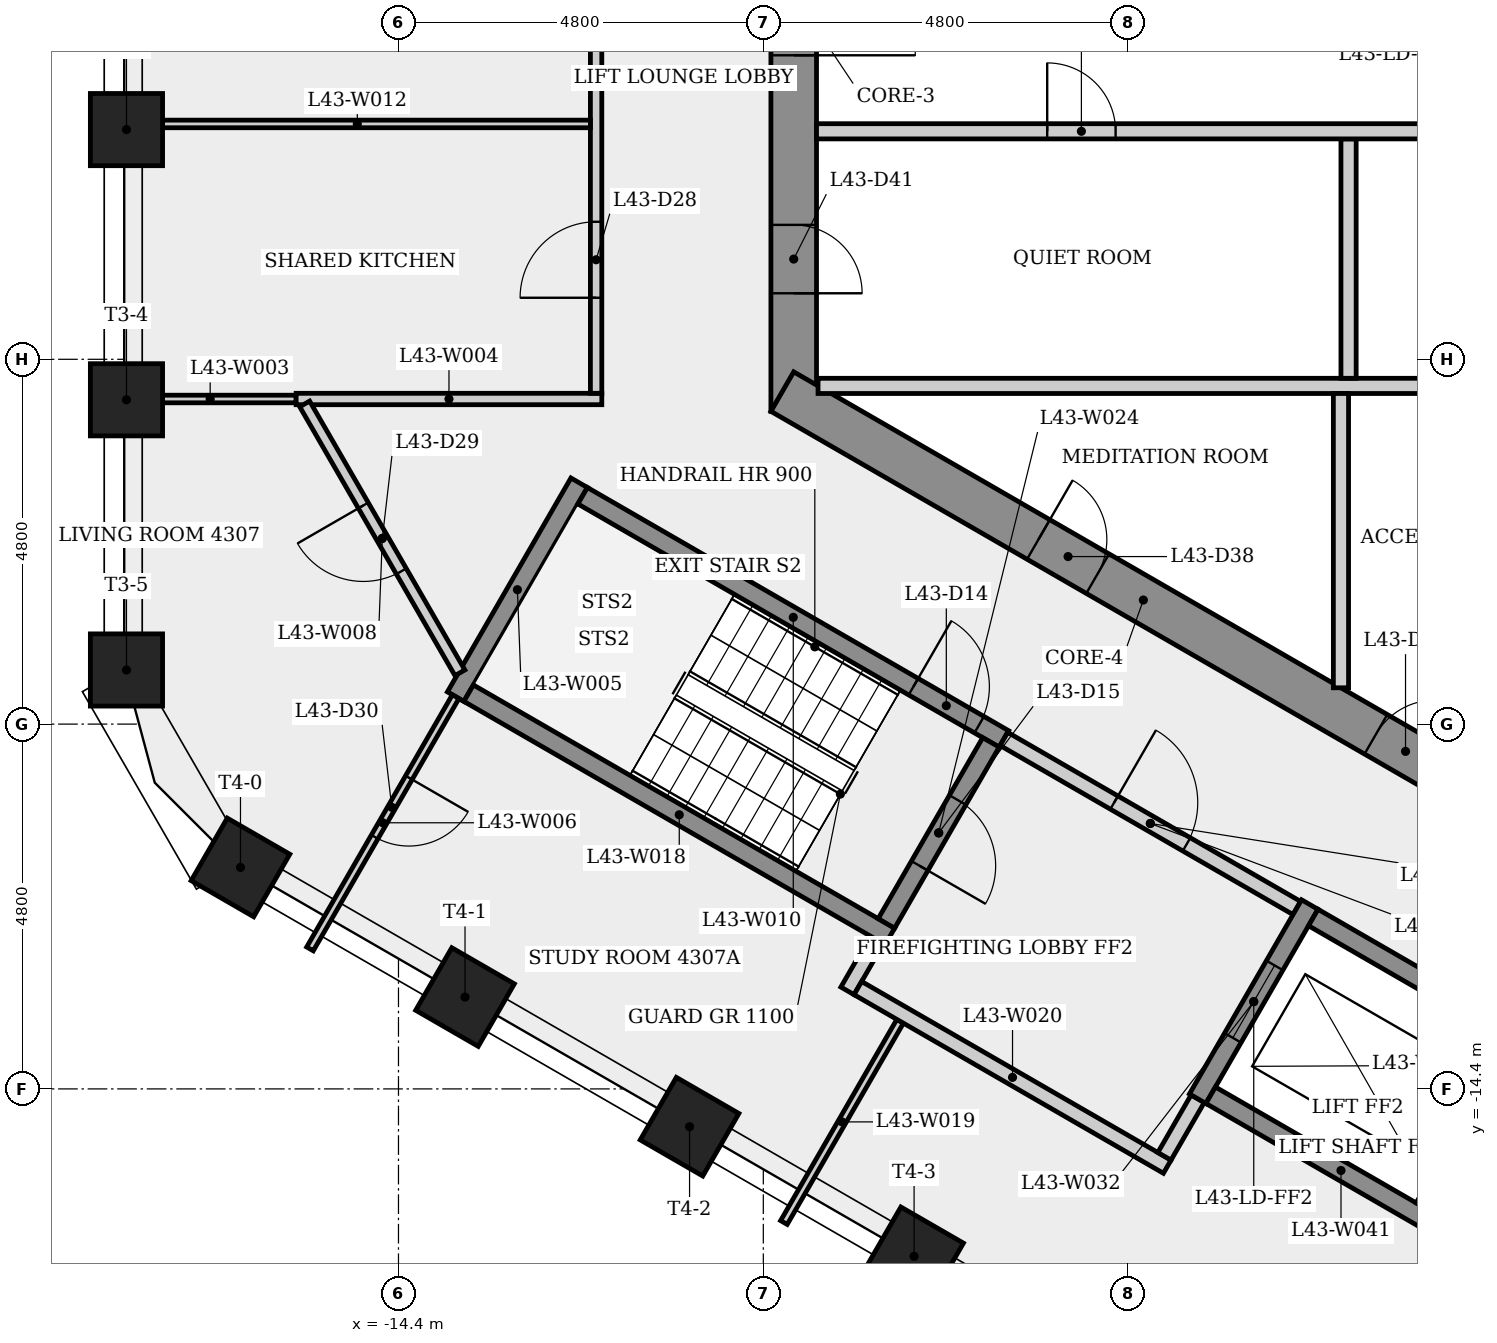
"""IFC4 building model, lengths in metres.
Left out: names, types, materials, properties, quantities, classifications, styles, units other than length and angle.
Written with IfcOpenShell. Run it as: python <this file> out.ifc"""

import sys

from ifc_helpers import new_model, si_unit, direction, frame, frame_2d, origin, origin_2d, place, context, subcontext, project, spatial, rectangle, extrude, element, fill, save


model = new_model("IFC4")
c1 = context("Model", 3, precision=1e-05, world=origin(), true_north=direction((0.0, 1.0)))
c2 = subcontext(c1, "Body", "Model", "MODEL_VIEW")
j1 = project(units=[si_unit("LENGTHUNIT", "METRE"), si_unit("PLANEANGLEUNIT", "RADIAN")], contexts=[c1])
p1 = place(None, origin())
s1 = spatial("IfcSite", under=j1, at=p1, CompositionType="ELEMENT")
p2 = place(p1, origin())
s2 = spatial("IfcBuilding", under=s1, at=p2, CompositionType="ELEMENT")
p3 = place(p2, frame((0.0, 0.0, 162.9)))
s3 = spatial("IfcBuildingStorey", under=s2, at=p3, CompositionType="ELEMENT", Elevation=162.9)
p4 = place(p3, frame((-9.2, 5.485, 0.0), z_axis=(0.0, 0.0, 1.0), x_axis=(0.0, -1.0, 0.0)))
e1 = element("IfcWall", 1, at=p4, inside=s3, PredefinedType="SHEAR", context=c2, shape_type="SweptSolid", body=[
    extrude(rectangle(XDim=10.97, YDim=0.6, at=frame_2d((5.485, 0.0))), origin(), (0.0, 0.0, 1.0), 3.4),
])
p5 = place(p4, frame((8.516, 0.0, 0.0)))
e2 = element("IfcOpeningElement", 2, at=p5, cuts=e1, PredefinedType="OPENING", context=c2, shape_type="SweptSolid", body=[
    extrude(rectangle(XDim=0.9, YDim=2.1, at=frame_2d((0.45, 1.05))), frame((0.0, 0.31, 0.0), z_axis=(0.0, -1.0, 0.0), x_axis=(1.0, 0.0, 0.0)), (0.0, 0.0, 1.0), 0.62),
])
p6 = place(p4, frame((4.685, 0.0, 0.0)))
e3 = element("IfcOpeningElement", 3, at=p6, cuts=e1, PredefinedType="OPENING", context=c2, shape_type="SweptSolid", body=[
    extrude(rectangle(XDim=1.6, YDim=2.1, at=frame_2d((0.8, 1.05))), frame((0.0, 0.31, 0.0), z_axis=(0.0, -1.0, 0.0), x_axis=(1.0, 0.0, 0.0)), (0.0, 0.0, 1.0), 0.62),
])
p7 = place(p3, frame((-9.35, -5.225, 0.0), z_axis=(0.0, 0.0, 1.0), x_axis=(0.866023993627, -0.500002442456, 0.0)))
e4 = element("IfcWall", 4, at=p7, inside=s3, PredefinedType="SHEAR", context=c2, shape_type="SweptSolid", body=[
    extrude(rectangle(XDim=10.97, YDim=0.6, at=frame_2d((5.485, 0.0))), origin(), (0.0, 0.0, 1.0), 3.4),
])
p8 = place(p7, frame((3.891, 0.0, 0.0)))
e5 = element("IfcOpeningElement", 5, at=p8, cuts=e4, PredefinedType="OPENING", context=c2, shape_type="SweptSolid", body=[
    extrude(rectangle(XDim=0.9, YDim=2.1, at=frame_2d((0.45, 1.05))), frame((0.0, 0.31, 0.0), z_axis=(0.0, -1.0, 0.0), x_axis=(1.0, 0.0, 0.0)), (0.0, 0.0, 1.0), 0.62),
])
p9 = place(p7, frame((9.018, 0.0, 0.0)))
e6 = element("IfcOpeningElement", 6, at=p9, cuts=e4, PredefinedType="OPENING", context=c2, shape_type="SweptSolid", body=[
    extrude(rectangle(XDim=0.9, YDim=2.1, at=frame_2d((0.45, 1.05))), frame((0.0, 0.31, 0.0), z_axis=(0.0, -1.0, 0.0), x_axis=(1.0, 0.0, 0.0)), (0.0, 0.0, 1.0), 0.62),
])
for number, where, z_axis, x_axis in (
    (7, (-17.979, -1.778, 0.0), (0.0, 0.0, 1.0), (-1.0, 0.0, 0.0)),
    (8, (-17.979, -5.333, 0.0), (0.0, 0.0, 1.0), (-1.0, 0.0, 0.0)),
    (9, (-17.979, -8.888, 0.0), (0.0, 0.0, 1.0), (-1.0, 0.0, 0.0)),
    (10, (-16.479, -11.486, 0.0), (0.0, 0.0, 1.0), (-0.5, -0.866, 0.0)),
    (11, (-13.525, -13.192, 0.0), (0.0, 0.0, 1.0), (-0.5, -0.866, 0.0)),
    (12, (-10.57, -14.897, 0.0), (0.0, 0.0, 1.0), (-0.5, -0.866, 0.0)),
    (13, (-7.616, -16.603, 0.0), (0.0, 0.0, 1.0), (-0.5, -0.866, 0.0)),
):
    element("IfcColumn", number, at=place(p3, frame(where, z_axis=z_axis, x_axis=x_axis)), inside=s3, PredefinedType="COLUMN", context=c2, shape_type="SweptSolid", body=[
        extrude(rectangle(XDim=0.95, YDim=0.95, at=origin_2d()), origin(), (0.0, 0.0, 1.0), 3.4),
    ])
p10 = place(p3, frame((-15.747, -5.323, 0.0), z_axis=(0.0, 0.0, 1.0), x_axis=(-1.0, 0.0, 0.0)))
e14 = element("IfcWall", 14, at=p10, inside=s3, PredefinedType="PARTITIONING", context=c2, shape_type="SweptSolid", body=[
    extrude(rectangle(XDim=2.262, YDim=0.1, at=frame_2d((1.131, 0.0))), origin(), (0.0, 0.0, 1.0), 3.05),
])
p11 = place(p3, frame((-15.747, -5.323, 0.0), z_axis=(0.0, 0.0, 1.0), x_axis=(1.0, 0.0, 0.0)))
e15 = element("IfcWall", 15, at=p11, inside=s3, PredefinedType="PARTITIONING", context=c2, shape_type="SweptSolid", body=[
    extrude(rectangle(XDim=4.022, YDim=0.15, at=frame_2d((2.011, 0.0))), origin(), (0.0, 0.0, 1.0), 3.05),
])
p12 = place(p3, frame((-13.648, -9.239, 0.0), z_axis=(0.0, 0.0, 1.0), x_axis=(0.500017246033, 0.866015446554, 0.0)))
e16 = element("IfcWall", 16, at=p12, inside=s3, PredefinedType="SHEAR", context=c2, shape_type="SweptSolid", body=[
    extrude(rectangle(XDim=3.25, YDim=0.25, at=frame_2d((1.625, 0.0))), origin(), (0.0, 0.0, 1.0), 3.05),
])
p13 = place(p3, frame((-13.648, -9.239, 0.0), z_axis=(0.0, 0.0, 1.0), x_axis=(-0.500044099915, -0.86599994119, 0.0)))
e17 = element("IfcWall", 17, at=p13, inside=s3, PredefinedType="PARTITIONING", context=c2, shape_type="SweptSolid", body=[
    extrude(rectangle(XDim=3.833, YDim=0.1, at=frame_2d((1.917, 0.0))), origin(), (0.0, 0.0, 1.0), 3.05),
])
p14 = place(p13, frame((1.231, 0.0, 0.0)))
e18 = element("IfcOpeningElement", 18, at=p14, cuts=e17, PredefinedType="OPENING", context=c2, shape_type="SweptSolid", body=[
    extrude(rectangle(XDim=0.9, YDim=2.1, at=frame_2d((0.45, 1.05))), frame((0.0, 0.06, 0.0), z_axis=(0.0, -1.0, 0.0), x_axis=(1.0, 0.0, 0.0)), (0.0, 0.0, 1.0), 0.12),
])
p15 = place(p3, frame((-13.592, -8.925, 0.0), z_axis=(0.0, 0.0, 1.0), x_axis=(-0.500034604092, 0.866005424181, 0.0)))
e19 = element("IfcWall", 19, at=p15, inside=s3, PredefinedType="PARTITIONING", context=c2, shape_type="SweptSolid", body=[
    extrude(rectangle(XDim=4.085, YDim=0.15, at=frame_2d((2.042, 0.0))), origin(), (0.0, 0.0, 1.0), 3.05),
])
p16 = place(p15, frame((1.542, 0.0, 0.0)))
e20 = element("IfcOpeningElement", 20, at=p16, cuts=e19, PredefinedType="OPENING", context=c2, shape_type="SweptSolid", body=[
    extrude(rectangle(XDim=1.0, YDim=2.1, at=frame_2d((0.5, 1.05))), frame((0.0, 0.085, 0.0), z_axis=(0.0, -1.0, 0.0), x_axis=(1.0, 0.0, 0.0)), (0.0, 0.0, 1.0), 0.17),
])
p17 = place(p3, frame((-11.977, -6.595, 0.0), z_axis=(0.0, 0.0, 1.0), x_axis=(0.866025499775, -0.499999833739, 0.0)))
e21 = element("IfcWall", 21, at=p17, inside=s3, PredefinedType="SHEAR", context=c2, shape_type="SweptSolid", body=[
    extrude(rectangle(XDim=6.4, YDim=0.25, at=frame_2d((3.2, 0.0))), origin(), (0.0, 0.0, 1.0), 3.05),
])
p18 = place(p17, frame((5.025, 0.0, 0.0)))
e22 = element("IfcOpeningElement", 22, at=p18, cuts=e21, PredefinedType="OPENING", context=c2, shape_type="SweptSolid", body=[
    extrude(rectangle(XDim=1.0, YDim=2.1, at=frame_2d((0.5, 1.05))), frame((0.0, 0.135, 0.0), z_axis=(0.0, -1.0, 0.0), x_axis=(1.0, 0.0, 0.0)), (0.0, 0.0, 1.0), 0.27),
])
p19 = place(p3, frame((-11.8, -5.247, 0.0), z_axis=(0.0, 0.0, 1.0), x_axis=(0.0, 1.0, 0.0)))
e23 = element("IfcWall", 23, at=p19, inside=s3, PredefinedType="PARTITIONING", context=c2, shape_type="SweptSolid", body=[
    extrude(rectangle(XDim=10.645, YDim=0.15, at=frame_2d((5.322, 0.0))), origin(), (0.0, 0.0, 1.0), 3.05),
])
p20 = place(p19, frame((6.557, 0.0, 0.0)))
e24 = element("IfcOpeningElement", 24, at=p20, cuts=e23, PredefinedType="OPENING", context=c2, shape_type="SweptSolid", body=[
    extrude(rectangle(XDim=1.0, YDim=2.1, at=frame_2d((0.5, 1.05))), frame((0.0, 0.085, 0.0), z_axis=(0.0, -1.0, 0.0), x_axis=(1.0, 0.0, 0.0)), (0.0, 0.0, 1.0), 0.17),
])
p21 = place(p19, frame((1.257, 0.0, 0.0)))
e25 = element("IfcOpeningElement", 25, at=p21, cuts=e23, PredefinedType="OPENING", context=c2, shape_type="SweptSolid", body=[
    extrude(rectangle(XDim=1.0, YDim=2.1, at=frame_2d((0.5, 1.05))), frame((0.0, 0.085, 0.0), z_axis=(0.0, -1.0, 0.0), x_axis=(1.0, 0.0, 0.0)), (0.0, 0.0, 1.0), 0.17),
])
p22 = place(p3, frame((-11.875, -1.703, 0.0), z_axis=(0.0, 0.0, 1.0), x_axis=(-1.0, 0.0, 0.0)))
e26 = element("IfcWall", 26, at=p22, inside=s3, PredefinedType="PARTITIONING", context=c2, shape_type="SweptSolid", body=[
    extrude(rectangle(XDim=6.134, YDim=0.1, at=frame_2d((3.067, 0.0))), origin(), (0.0, 0.0, 1.0), 3.05),
])
p23 = place(p3, frame((-8.88, -5.15, 0.0), z_axis=(0.0, 0.0, 1.0), x_axis=(1.0, 0.0, 0.0)))
e27 = element("IfcWall", 27, at=p23, inside=s3, PredefinedType="PARTITIONING", context=c2, shape_type="SweptSolid", body=[
    extrude(rectangle(XDim=11.205, YDim=0.2, at=frame_2d((5.603, 0.0))), origin(), (0.0, 0.0, 1.0), 3.05),
])
p24 = place(p3, frame((-8.493, -13.11, 0.0), z_axis=(0.0, 0.0, 1.0), x_axis=(0.500067724834, 0.865986299303, 0.0)))
e28 = element("IfcWall", 28, at=p24, inside=s3, PredefinedType="PARTITIONING", context=c2, shape_type="SweptSolid", body=[
    extrude(rectangle(XDim=0.775, YDim=0.2, at=frame_2d((0.388, 0.0))), origin(), (0.0, 0.0, 1.0), 3.05),
])
p25 = place(p3, frame((-7.935, -12.393, 0.0), z_axis=(0.0, 0.0, 1.0), x_axis=(-0.866025499775, 0.499999833739, 0.0)))
e29 = element("IfcWall", 29, at=p25, inside=s3, PredefinedType="SHEAR", context=c2, shape_type="SweptSolid", body=[
    extrude(rectangle(XDim=6.4, YDim=0.25, at=frame_2d((3.2, 0.0))), origin(), (0.0, 0.0, 1.0), 3.05),
])
p26 = place(p3, frame((-7.8, -13.51, 0.0), z_axis=(0.0, 0.0, 1.0), x_axis=(-0.500003532061, -0.866023364538, 0.0)))
e30 = element("IfcWall", 30, at=p26, inside=s3, PredefinedType="PARTITIONING", context=c2, shape_type="SweptSolid", body=[
    extrude(rectangle(XDim=3.058, YDim=0.1, at=frame_2d((1.529, 0.0))), origin(), (0.0, 0.0, 1.0), 3.05),
])
p27 = place(p3, frame((-8.356, -13.073, 0.0), z_axis=(0.0, 0.0, 1.0), x_axis=(0.866038532462, -0.499977259774, 0.0)))
e31 = element("IfcWall", 31, at=p27, inside=s3, PredefinedType="PARTITIONING", context=c2, shape_type="SweptSolid", body=[
    extrude(rectangle(XDim=4.7, YDim=0.2, at=frame_2d((2.35, 0.0))), origin(), (0.0, 0.0, 1.0), 3.05),
])
p28 = place(p3, frame((-6.605, -9.841, 0.0), z_axis=(0.0, 0.0, 1.0), x_axis=(-0.499996545922, -0.866027397988, 0.0)))
e32 = element("IfcWall", 32, at=p28, inside=s3, PredefinedType="SHEAR", context=c2, shape_type="SweptSolid", body=[
    extrude(rectangle(XDim=2.75, YDim=0.25, at=frame_2d((1.375, 0.0))), origin(), (0.0, 0.0, 1.0), 3.05),
])
p29 = place(p28, frame((0.875, 0.0, 0.0)))
e33 = element("IfcOpeningElement", 33, at=p29, cuts=e32, PredefinedType="OPENING", context=c2, shape_type="SweptSolid", body=[
    extrude(rectangle(XDim=1.0, YDim=2.1, at=frame_2d((0.5, 1.05))), frame((0.0, 0.135, 0.0), z_axis=(0.0, -1.0, 0.0), x_axis=(1.0, 0.0, 0.0)), (0.0, 0.0, 1.0), 0.27),
])
p30 = place(p3, frame((-6.435, -9.795, 0.0), z_axis=(0.0, 0.0, 1.0), x_axis=(0.866012907634, -0.500021643343, 0.0)))
e34 = element("IfcWall", 34, at=p30, inside=s3, PredefinedType="PARTITIONING", context=c2, shape_type="SweptSolid", body=[
    extrude(rectangle(XDim=4.45, YDim=0.2, at=frame_2d((2.225, 0.0))), origin(), (0.0, 0.0, 1.0), 3.05),
])
p31 = place(p30, frame((1.675, 0.0, 0.0)))
e35 = element("IfcOpeningElement", 35, at=p31, cuts=e34, PredefinedType="OPENING", context=c2, shape_type="SweptSolid", body=[
    extrude(rectangle(XDim=1.1, YDim=2.1, at=frame_2d((0.55, 1.05))), frame((0.0, 0.11, 0.0), z_axis=(0.0, -1.0, 0.0), x_axis=(1.0, 0.0, 0.0)), (0.0, 0.0, 1.0), 0.22),
])
p32 = place(p3, frame((-3.885, -14.529, 0.0), z_axis=(0.0, 0.0, 1.0), x_axis=(-0.499859285417, -0.866106630146, 0.0)))
e36 = element("IfcWall", 36, at=p32, inside=s3, PredefinedType="PARTITIONING", context=c2, shape_type="SweptSolid", body=[
    extrude(rectangle(XDim=0.875, YDim=0.2, at=frame_2d((0.438, 0.0))), origin(), (0.0, 0.0, 1.0), 3.05),
])
p33 = place(p3, frame((-2.41, -11.974, 0.0), z_axis=(0.0, 0.0, 1.0), x_axis=(-0.500001826776, -0.866024349092, 0.0)))
e37 = element("IfcWall", 37, at=p33, inside=s3, PredefinedType="SHEAR", context=c2, shape_type="SweptSolid", body=[
    extrude(rectangle(XDim=2.95, YDim=0.25, at=frame_2d((1.475, 0.0))), origin(), (0.0, 0.0, 1.0), 3.05),
])
p34 = place(p33, frame((0.925, 0.0, 0.0)))
e38 = element("IfcOpeningElement", 38, at=p34, cuts=e37, PredefinedType="OPENING", context=c2, shape_type="SweptSolid", body=[
    extrude(rectangle(XDim=1.1, YDim=2.1, at=frame_2d((0.55, 1.05))), frame((0.0, 0.135, 0.0), z_axis=(0.0, -1.0, 0.0), x_axis=(1.0, 0.0, 0.0)), (0.0, 0.0, 1.0), 0.27),
])
p35 = place(p3, frame((-2.364, -12.145, 0.0), z_axis=(0.0, 0.0, 1.0), x_axis=(0.866040211805, -0.499974350878, 0.0)))
e39 = element("IfcWall", 39, at=p35, inside=s3, PredefinedType="SHEAR", context=c2, shape_type="SweptSolid", body=[
    extrude(rectangle(XDim=3.3, YDim=0.25, at=frame_2d((1.65, 0.0))), origin(), (0.0, 0.0, 1.0), 3.05),
])
p36 = place(p3, frame((-2.0, -5.25, 0.0), z_axis=(0.0, 0.0, 1.0), x_axis=(0.0, -1.0, 0.0)))
e40 = element("IfcWall", 40, at=p36, inside=s3, PredefinedType="PARTITIONING", context=c2, shape_type="SweptSolid", body=[
    extrude(rectangle(XDim=3.872, YDim=0.2, at=frame_2d((1.936, 0.0))), origin(), (0.0, 0.0, 1.0), 3.05),
])
p37 = place(p3, frame((-1.9, -1.9, 0.0), z_axis=(0.0, 0.0, 1.0), x_axis=(0.0, -1.0, 0.0)))
e41 = element("IfcWall", 41, at=p37, inside=s3, PredefinedType="PARTITIONING", context=c2, shape_type="SweptSolid", body=[
    extrude(rectangle(XDim=3.15, YDim=0.2, at=frame_2d((1.575, 0.0))), origin(), (0.0, 0.0, 1.0), 3.05),
])
p38 = place(p3, frame((-8.9, -1.8, 0.0), z_axis=(0.0, 0.0, 1.0), x_axis=(1.0, 0.0, 0.0)))
e42 = element("IfcWall", 42, at=p38, inside=s3, PredefinedType="PARTITIONING", context=c2, shape_type="SweptSolid", body=[
    extrude(rectangle(XDim=11.225, YDim=0.2, at=frame_2d((5.613, 0.0))), origin(), (0.0, 0.0, 1.0), 3.05),
])
p39 = place(p38, frame((3.035, 0.0, 0.0)))
e43 = element("IfcOpeningElement", 43, at=p39, cuts=e42, PredefinedType="OPENING", context=c2, shape_type="SweptSolid", body=[
    extrude(rectangle(XDim=0.9, YDim=2.1, at=frame_2d((0.45, 1.05))), frame((0.0, 0.11, 0.0), z_axis=(0.0, -1.0, 0.0), x_axis=(1.0, 0.0, 0.0)), (0.0, 0.0, 1.0), 0.22),
])
p40 = place(p38, frame((9.613, 0.0, 0.0)))
e44 = element("IfcOpeningElement", 44, at=p40, cuts=e42, PredefinedType="OPENING", context=c2, shape_type="SweptSolid", body=[
    extrude(rectangle(XDim=0.9, YDim=2.1, at=frame_2d((0.45, 1.05))), frame((0.0, 0.11, 0.0), z_axis=(0.0, -1.0, 0.0), x_axis=(1.0, 0.0, 0.0)), (0.0, 0.0, 1.0), 0.22),
])
p41 = place(p3, frame((-0.856, -16.133, 0.0), z_axis=(0.0, 0.0, 1.0), x_axis=(-0.866021716278, 0.500006386895, 0.0)))
e45 = element("IfcWall", 45, at=p41, inside=s3, PredefinedType="SHEAR", context=c2, shape_type="SweptSolid", body=[
    extrude(rectangle(XDim=3.3, YDim=0.25, at=frame_2d((1.65, 0.0))), origin(), (0.0, 0.0, 1.0), 3.05),
])
p42 = place(p3, frame((-0.902, -15.962, 0.0), z_axis=(0.0, 0.0, 1.0), x_axis=(0.500061746146, 0.865989751695, 0.0)))
e46 = element("IfcWall", 46, at=p42, inside=s3, PredefinedType="SHEAR", context=c2, shape_type="SweptSolid", body=[
    extrude(rectangle(XDim=2.45, YDim=0.25, at=frame_2d((1.225, 0.0))), origin(), (0.0, 0.0, 1.0), 3.4),
])
p43 = place(p39, origin())
e47 = element("IfcDoor", 47, at=p43, inside=s3, OperationType="SINGLE_SWING_LEFT", PredefinedType="DOOR", context=c2, shape_type="SweptSolid", body=[
    extrude(rectangle(XDim=0.9, YDim=2.1, at=frame_2d((0.45, 1.05))), frame((0.0, 0.025, 0.0), z_axis=(0.0, -1.0, 0.0), x_axis=(1.0, 0.0, 0.0)), (0.0, 0.0, 1.0), 0.05),
])
fill(e43, e47)
p44 = place(p18, origin())
e48 = element("IfcDoor", 48, at=p44, inside=s3, OperationType="SINGLE_SWING_LEFT", PredefinedType="DOOR", context=c2, shape_type="SweptSolid", body=[
    extrude(rectangle(XDim=1.0, YDim=2.1, at=frame_2d((0.5, 1.05))), frame((0.0, 0.025, 0.0), z_axis=(0.0, -1.0, 0.0), x_axis=(1.0, 0.0, 0.0)), (0.0, 0.0, 1.0), 0.05),
])
fill(e22, e48)
p45 = place(p29, origin())
e49 = element("IfcDoor", 49, at=p45, inside=s3, OperationType="SINGLE_SWING_RIGHT", PredefinedType="DOOR", context=c2, shape_type="SweptSolid", body=[
    extrude(rectangle(XDim=1.0, YDim=2.1, at=frame_2d((0.5, 1.05))), frame((0.0, 0.025, 0.0), z_axis=(0.0, -1.0, 0.0), x_axis=(1.0, 0.0, 0.0)), (0.0, 0.0, 1.0), 0.05),
])
fill(e33, e49)
p46 = place(p31, origin())
e50 = element("IfcDoor", 50, at=p46, inside=s3, OperationType="SINGLE_SWING_LEFT", PredefinedType="DOOR", context=c2, shape_type="SweptSolid", body=[
    extrude(rectangle(XDim=1.1, YDim=2.1, at=frame_2d((0.55, 1.05))), frame((0.0, 0.025, 0.0), z_axis=(0.0, -1.0, 0.0), x_axis=(1.0, 0.0, 0.0)), (0.0, 0.0, 1.0), 0.05),
])
fill(e35, e50)
p47 = place(p34, origin())
e51 = element("IfcDoor", 51, at=p47, inside=s3, OperationType="SLIDING_TO_LEFT", PredefinedType="DOOR", context=c2, shape_type="SweptSolid", body=[
    extrude(rectangle(XDim=1.1, YDim=2.1, at=frame_2d((0.55, 1.05))), frame((0.0, 0.025, 0.0), z_axis=(0.0, -1.0, 0.0), x_axis=(1.0, 0.0, 0.0)), (0.0, 0.0, 1.0), 0.05),
])
fill(e38, e51)
p48 = place(p21, origin())
e52 = element("IfcDoor", 52, at=p48, inside=s3, OperationType="SINGLE_SWING_LEFT", PredefinedType="DOOR", context=c2, shape_type="SweptSolid", body=[
    extrude(rectangle(XDim=1.0, YDim=2.1, at=frame_2d((0.5, 1.05))), frame((0.0, 0.025, 0.0), z_axis=(0.0, -1.0, 0.0), x_axis=(1.0, 0.0, 0.0)), (0.0, 0.0, 1.0), 0.05),
])
fill(e25, e52)
p49 = place(p16, origin())
e53 = element("IfcDoor", 53, at=p49, inside=s3, OperationType="SINGLE_SWING_RIGHT", PredefinedType="DOOR", context=c2, shape_type="SweptSolid", body=[
    extrude(rectangle(XDim=1.0, YDim=2.1, at=frame_2d((0.5, 1.05))), frame((0.0, 0.025, 0.0), z_axis=(0.0, -1.0, 0.0), x_axis=(1.0, 0.0, 0.0)), (0.0, 0.0, 1.0), 0.05),
])
fill(e20, e53)
p50 = place(p14, origin())
e54 = element("IfcDoor", 54, at=p50, inside=s3, OperationType="SINGLE_SWING_LEFT", PredefinedType="DOOR", context=c2, shape_type="SweptSolid", body=[
    extrude(rectangle(XDim=0.9, YDim=2.1, at=frame_2d((0.45, 1.05))), frame((0.0, 0.025, 0.0), z_axis=(0.0, -1.0, 0.0), x_axis=(1.0, 0.0, 0.0)), (0.0, 0.0, 1.0), 0.05),
])
fill(e18, e54)
p51 = place(p8, origin())
e55 = element("IfcDoor", 55, at=p51, inside=s3, OperationType="SINGLE_SWING_LEFT", PredefinedType="DOOR", context=c2, shape_type="SweptSolid", body=[
    extrude(rectangle(XDim=0.9, YDim=2.1, at=frame_2d((0.45, 1.05))), frame((0.0, 0.025, 0.0), z_axis=(0.0, -1.0, 0.0), x_axis=(1.0, 0.0, 0.0)), (0.0, 0.0, 1.0), 0.05),
])
fill(e5, e55)
p52 = place(p9, origin())
e56 = element("IfcDoor", 56, at=p52, inside=s3, OperationType="SINGLE_SWING_RIGHT", PredefinedType="DOOR", context=c2, shape_type="SweptSolid", body=[
    extrude(rectangle(XDim=0.9, YDim=2.1, at=frame_2d((0.45, 1.05))), frame((0.0, 0.025, 0.0), z_axis=(0.0, -1.0, 0.0), x_axis=(1.0, 0.0, 0.0)), (0.0, 0.0, 1.0), 0.05),
])
fill(e6, e56)
p53 = place(p5, origin())
e57 = element("IfcDoor", 57, at=p53, inside=s3, OperationType="SINGLE_SWING_RIGHT", PredefinedType="DOOR", context=c2, shape_type="SweptSolid", body=[
    extrude(rectangle(XDim=0.9, YDim=2.1, at=frame_2d((0.45, 1.05))), frame((0.0, 0.025, 0.0), z_axis=(0.0, -1.0, 0.0), x_axis=(1.0, 0.0, 0.0)), (0.0, 0.0, 1.0), 0.05),
])
fill(e2, e57)
p54 = place(p6, origin())
e58 = element("IfcDoor", 58, at=p54, inside=s3, OperationType="SINGLE_SWING_RIGHT", PredefinedType="DOOR", context=c2, shape_type="SweptSolid", body=[
    extrude(rectangle(XDim=1.6, YDim=2.1, at=frame_2d((0.8, 1.05))), frame((0.0, 0.025, 0.0), z_axis=(0.0, -1.0, 0.0), x_axis=(1.0, 0.0, 0.0)), (0.0, 0.0, 1.0), 0.05),
])
fill(e3, e58)
save(model, sys.argv[1])
